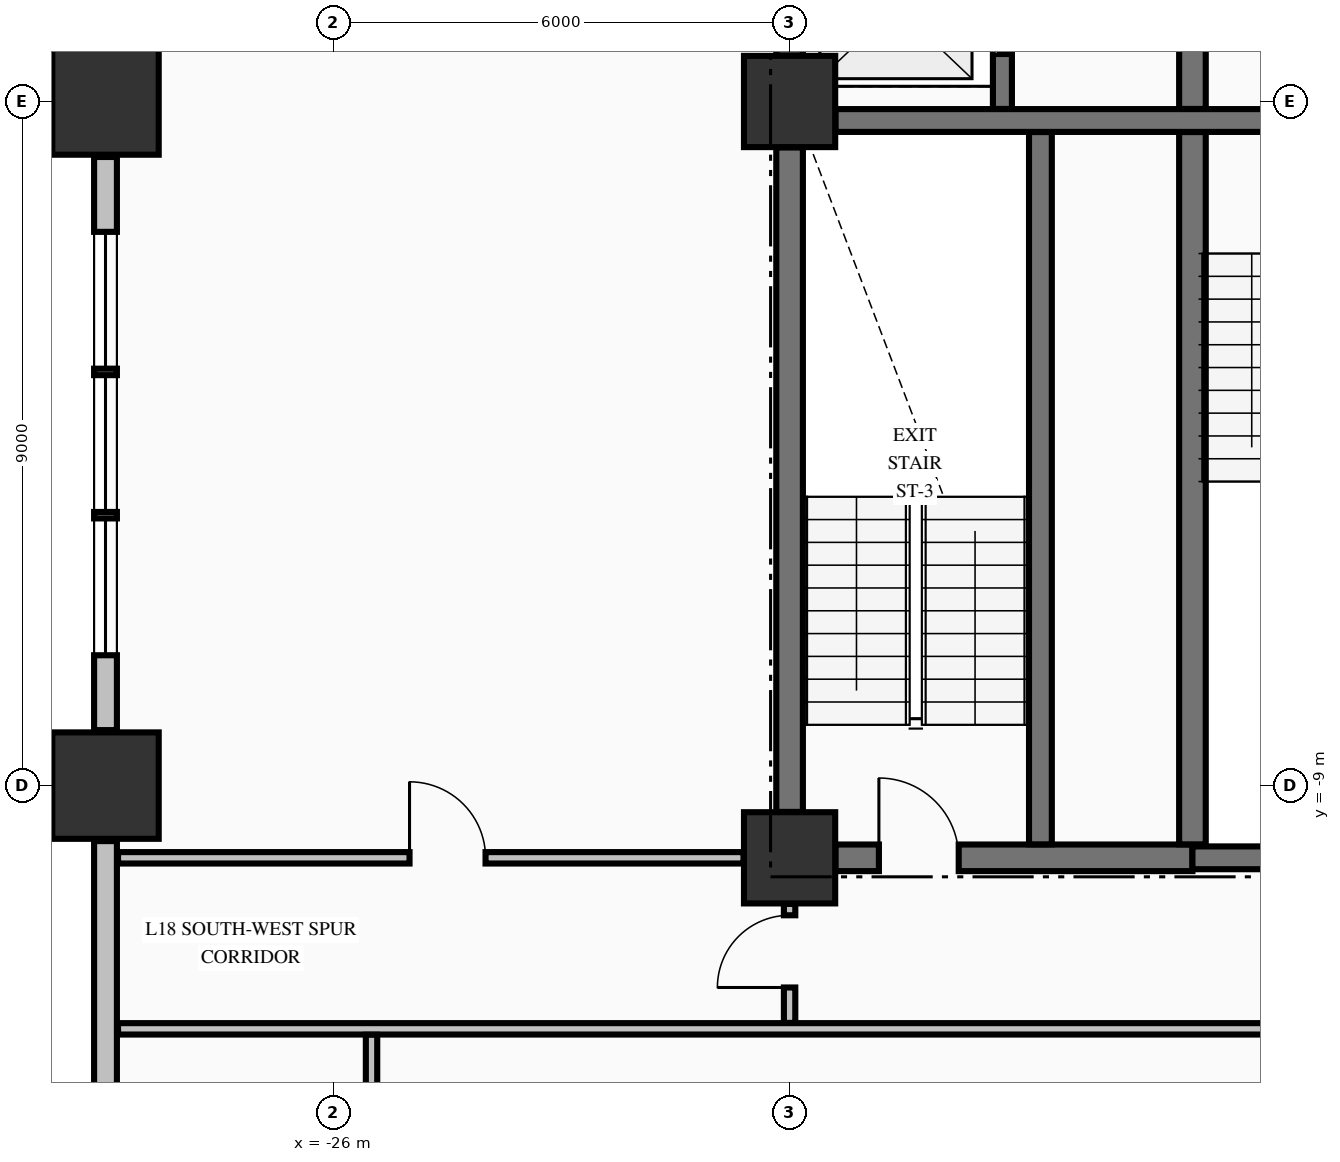
"""IFC4 building model, lengths in metres.
Left out: names, types, materials, properties, quantities, classifications, styles, units other than length and angle.
Written with IfcOpenShell. Run it as: python <this file> out.ifc"""

import sys

from ifc_helpers import new_model, si_unit, direction, frame, frame_2d, origin, origin_2d, place, context, subcontext, project, spatial, rectangle, extrude, element, fill, save


model = new_model("IFC4")
c1 = context("Model", 3, precision=1e-05, world=origin(), true_north=direction((0.0, 1.0)))
c2 = subcontext(c1, "Body", "Model", "MODEL_VIEW")
j1 = project(units=[si_unit("LENGTHUNIT", "METRE"), si_unit("PLANEANGLEUNIT", "RADIAN")], contexts=[c1])
p1 = place(None, origin())
s1 = spatial("IfcSite", under=j1, at=p1, CompositionType="ELEMENT")
p2 = place(p1, origin())
s2 = spatial("IfcBuilding", under=s1, at=p2, CompositionType="ELEMENT")
p3 = place(p2, frame((0.0, 0.0, 75.04)))
s3 = spatial("IfcBuildingStorey", under=s2, at=p3, CompositionType="ELEMENT", Elevation=75.04)
for number, where, z_axis, x_axis in (
    (1, (-29.0, -9.0, -0.25), (0.0, 0.0, 1.0), (1.0, 0.0, 0.0)),
    (2, (-29.0, 0.0, -0.25), (0.0, 0.0, 1.0), (1.0, 0.0, 0.0)),
):
    element("IfcColumn", number, at=place(p3, frame(where, z_axis=z_axis, x_axis=x_axis)), inside=s3, PredefinedType="COLUMN", context=c2, shape_type="SweptSolid", body=[
        extrude(rectangle(XDim=1.4, YDim=1.4, at=origin_2d()), origin(), (0.0, 0.0, 1.0), 3.57),
    ])
for number, where, z_axis, x_axis in (
    (3, (-20.0, -9.95, -0.25), (0.0, 0.0, 1.0), (1.0, 0.0, 0.0)),
    (4, (-20.0, 0.0, -0.25), (0.0, 0.0, 1.0), (1.0, 0.0, 0.0)),
):
    element("IfcColumn", number, at=place(p3, frame(where, z_axis=z_axis, x_axis=x_axis)), inside=s3, PredefinedType="COLUMN", context=c2, shape_type="SweptSolid", body=[
        extrude(rectangle(XDim=1.2, YDim=1.2, at=origin_2d()), origin(), (0.0, 0.0, 1.0), 3.57),
    ])
p4 = place(p3, frame((-29.0, -9.73, 0.0), z_axis=(0.0, 0.0, 1.0), x_axis=(0.0, -1.0, 0.0)))
e5 = element("IfcWall", 5, at=p4, inside=s3, PredefinedType="STANDARD", context=c2, shape_type="SweptSolid", body=[
    extrude(rectangle(XDim=12.54, YDim=0.3, at=frame_2d((6.27, 0.0))), origin(), (0.0, 0.0, 1.0), 2.712),
])
p5 = place(p3, frame((-29.0, -0.73, 0.0), z_axis=(0.0, 0.0, 1.0), x_axis=(0.0, -1.0, 0.0)))
e6 = element("IfcWall", 6, at=p5, inside=s3, PredefinedType="STANDARD", context=c2, shape_type="SweptSolid", body=[
    extrude(rectangle(XDim=7.54, YDim=0.3, at=frame_2d((3.77, 0.0))), origin(), (0.0, 0.0, 1.0), 2.712),
])
p6 = place(p5, frame((0.985, 0.0, 0.78)))
e7 = element("IfcOpeningElement", 7, at=p6, cuts=e6, PredefinedType="OPENING", context=c2, shape_type="SweptSolid", body=[
    extrude(rectangle(XDim=1.8, YDim=1.72, at=frame_2d((0.9, 0.86))), frame((0.0, 0.16, 0.0), z_axis=(0.0, -1.0, 0.0), x_axis=(1.0, 0.0, 0.0)), (0.0, 0.0, 1.0), 0.32),
])
p7 = place(p5, frame((2.87, 0.0, 0.78)))
e8 = element("IfcOpeningElement", 8, at=p7, cuts=e6, PredefinedType="OPENING", context=c2, shape_type="SweptSolid", body=[
    extrude(rectangle(XDim=1.8, YDim=1.72, at=frame_2d((0.9, 0.86))), frame((0.0, 0.16, 0.0), z_axis=(0.0, -1.0, 0.0), x_axis=(1.0, 0.0, 0.0)), (0.0, 0.0, 1.0), 0.32),
])
p8 = place(p5, frame((4.755, 0.0, 0.78)))
e9 = element("IfcOpeningElement", 9, at=p8, cuts=e6, PredefinedType="OPENING", context=c2, shape_type="SweptSolid", body=[
    extrude(rectangle(XDim=1.8, YDim=1.72, at=frame_2d((0.9, 0.86))), frame((0.0, 0.16, 0.0), z_axis=(0.0, -1.0, 0.0), x_axis=(1.0, 0.0, 0.0)), (0.0, 0.0, 1.0), 0.32),
])
p9 = place(p3, frame((-19.396, -9.95, 0.0), z_axis=(0.0, 0.0, 1.0), x_axis=(1.0, 0.0, 0.0)))
e10 = element("IfcWall", 10, at=p9, inside=s3, PredefinedType="SHEAR", context=c2, shape_type="SweptSolid", body=[
    extrude(rectangle(XDim=4.696, YDim=0.35, at=frame_2d((2.348, 0.0))), origin(), (0.0, 0.0, 1.0), 3.32),
])
p10 = place(p9, frame((0.571, 0.0, 0.0)))
e11 = element("IfcOpeningElement", 11, at=p10, cuts=e10, PredefinedType="OPENING", context=c2, shape_type="SweptSolid", body=[
    extrude(rectangle(XDim=1.05, YDim=2.15, at=frame_2d((0.525, 1.075))), frame((0.0, 0.185, 0.0), z_axis=(0.0, -1.0, 0.0), x_axis=(1.0, 0.0, 0.0)), (0.0, 0.0, 1.0), 0.37),
])
p11 = place(p3, frame((-14.7, -9.95, 0.0), z_axis=(0.0, 0.0, 1.0), x_axis=(1.0, 0.0, 0.0)))
e12 = element("IfcWall", 12, at=p11, inside=s3, PredefinedType="SHEAR", context=c2, shape_type="SweptSolid", body=[
    extrude(rectangle(XDim=3.096, YDim=0.3, at=frame_2d((1.548, 0.0))), origin(), (0.0, 0.0, 1.0), 3.32),
])
p12 = place(p3, frame((-19.396, -0.25, 0.0), z_axis=(0.0, 0.0, 1.0), x_axis=(1.0, 0.0, 0.0)))
e13 = element("IfcWall", 13, at=p12, inside=s3, PredefinedType="SHEAR", context=c2, shape_type="SweptSolid", body=[
    extrude(rectangle(XDim=7.792, YDim=0.3, at=frame_2d((3.896, 0.0))), origin(), (0.0, 0.0, 1.0), 3.32),
])
p13 = place(p12, frame((5.696, 0.0, 0.0)))
e14 = element("IfcOpeningElement", 14, at=p13, cuts=e13, PredefinedType="OPENING", context=c2, shape_type="SweptSolid", body=[
    extrude(rectangle(XDim=1.1, YDim=2.15, at=frame_2d((0.55, 1.075))), frame((0.0, 0.16, 0.0), z_axis=(0.0, -1.0, 0.0), x_axis=(1.0, 0.0, 0.0)), (0.0, 0.0, 1.0), 0.32),
])
p14 = place(p3, frame((-28.835, -12.2, 0.0), z_axis=(0.0, 0.0, 1.0), x_axis=(1.0, 0.0, 0.0)))
e15 = element("IfcWall", 15, at=p14, inside=s3, PredefinedType="PARTITIONING", context=c2, shape_type="SweptSolid", body=[
    extrude(rectangle(XDim=52.67, YDim=0.15, at=frame_2d((26.335, 0.0))), origin(), (0.0, 0.0, 1.0), 3.32),
])
p15 = place(p14, frame((30.685, 0.0, 0.0)))
e16 = element("IfcOpeningElement", 16, at=p15, cuts=e15, PredefinedType="OPENING", context=c2, shape_type="SweptSolid", body=[
    extrude(rectangle(XDim=1.1, YDim=2.15, at=frame_2d((0.55, 1.075))), frame((0.0, 0.085, 0.0), z_axis=(0.0, -1.0, 0.0), x_axis=(1.0, 0.0, 0.0)), (0.0, 0.0, 1.0), 0.17),
])
p16 = place(p14, frame((15.41, 0.0, 0.0)))
e17 = element("IfcOpeningElement", 17, at=p16, cuts=e15, PredefinedType="OPENING", context=c2, shape_type="SweptSolid", body=[
    extrude(rectangle(XDim=1.05, YDim=2.15, at=frame_2d((0.525, 1.075))), frame((0.0, 0.085, 0.0), z_axis=(0.0, -1.0, 0.0), x_axis=(1.0, 0.0, 0.0)), (0.0, 0.0, 1.0), 0.17),
])
p17 = place(p14, frame((41.21, 0.0, 0.0)))
e18 = element("IfcOpeningElement", 18, at=p17, cuts=e15, PredefinedType="OPENING", context=c2, shape_type="SweptSolid", body=[
    extrude(rectangle(XDim=1.05, YDim=2.15, at=frame_2d((0.525, 1.075))), frame((0.0, 0.085, 0.0), z_axis=(0.0, -1.0, 0.0), x_axis=(1.0, 0.0, 0.0)), (0.0, 0.0, 1.0), 0.17),
])
p18 = place(p3, frame((-28.835, -9.95, 0.0), z_axis=(0.0, 0.0, 1.0), x_axis=(1.0, 0.0, 0.0)))
e19 = element("IfcWall", 19, at=p18, inside=s3, PredefinedType="PARTITIONING", context=c2, shape_type="SweptSolid", body=[
    extrude(rectangle(XDim=8.229, YDim=0.15, at=frame_2d((4.115, 0.0))), origin(), (0.0, 0.0, 1.0), 3.32),
])
p19 = place(p18, frame((3.835, 0.0, 0.0)))
e20 = element("IfcOpeningElement", 20, at=p19, cuts=e19, PredefinedType="OPENING", context=c2, shape_type="SweptSolid", body=[
    extrude(rectangle(XDim=1.0, YDim=2.15, at=frame_2d((0.5, 1.075))), frame((0.0, 0.085, 0.0), z_axis=(0.0, -1.0, 0.0), x_axis=(1.0, 0.0, 0.0)), (0.0, 0.0, 1.0), 0.17),
])
p20 = place(p3, frame((-20.0, -9.346, 0.0), z_axis=(0.0, 0.0, 1.0), x_axis=(0.0, 1.0, 0.0)))
e21 = element("IfcWall", 21, at=p20, inside=s3, PredefinedType="SHEAR", context=c2, shape_type="SweptSolid", body=[
    extrude(rectangle(XDim=8.742, YDim=0.35, at=frame_2d((4.371, 0.0))), origin(), (0.0, 0.0, 1.0), 3.32),
])
p21 = place(p3, frame((-20.0, 0.604, 0.0), z_axis=(0.0, 0.0, 1.0), x_axis=(0.0, 1.0, 0.0)))
e22 = element("IfcWall", 22, at=p21, inside=s3, PredefinedType="SHEAR", context=c2, shape_type="SweptSolid", body=[
    extrude(rectangle(XDim=1.869, YDim=0.35, at=frame_2d((0.935, 0.0))), origin(), (0.0, 0.0, 1.0), 3.32),
])
p22 = place(p3, frame((-17.2, -0.098, 0.0), z_axis=(0.0, 0.0, 1.0), x_axis=(0.0, 1.0, 0.0)))
e23 = element("IfcWall", 23, at=p22, inside=s3, PredefinedType="SOLIDWALL", context=c2, shape_type="SweptSolid", body=[
    extrude(rectangle(XDim=2.571, YDim=0.25, at=frame_2d((1.285, 0.0))), origin(), (0.0, 0.0, 1.0), 3.32),
])
p23 = place(p22, frame((0.723, 0.0, 0.0)))
e24 = element("IfcOpeningElement", 24, at=p23, cuts=e23, PredefinedType="OPENING", context=c2, shape_type="SweptSolid", body=[
    extrude(rectangle(XDim=1.1, YDim=2.2, at=frame_2d((0.55, 1.1))), frame((0.0, 0.135, 0.0), z_axis=(0.0, -1.0, 0.0), x_axis=(1.0, 0.0, 0.0)), (0.0, 0.0, 1.0), 0.27),
])
p24 = place(p3, frame((-16.7, -9.773, 0.0), z_axis=(0.0, 0.0, 1.0), x_axis=(0.0, 1.0, 0.0)))
e25 = element("IfcWall", 25, at=p24, inside=s3, PredefinedType="SHEAR", context=c2, shape_type="SweptSolid", body=[
    extrude(rectangle(XDim=9.371, YDim=0.3, at=frame_2d((4.686, 0.0))), origin(), (0.0, 0.0, 1.0), 3.32),
])
p25 = place(p3, frame((-14.7, -9.773, 0.0), z_axis=(0.0, 0.0, 1.0), x_axis=(0.0, 1.0, 0.0)))
e26 = element("IfcWall", 26, at=p25, inside=s3, PredefinedType="SHEAR", context=c2, shape_type="SweptSolid", body=[
    extrude(rectangle(XDim=9.371, YDim=0.35, at=frame_2d((4.686, 0.0))), origin(), (0.0, 0.0, 1.0), 3.32),
])
p26 = place(p3, frame((-14.7, -0.098, 0.0), z_axis=(0.0, 0.0, 1.0), x_axis=(0.0, 1.0, 0.0)))
e27 = element("IfcWall", 27, at=p26, inside=s3, PredefinedType="SHEAR", context=c2, shape_type="SweptSolid", body=[
    extrude(rectangle(XDim=2.846, YDim=0.35, at=frame_2d((1.423, 0.0))), origin(), (0.0, 0.0, 1.0), 3.32),
])
p27 = place(p3, frame((-25.5, -22.294, 0.0), z_axis=(0.0, 0.0, 1.0), x_axis=(0.0, 1.0, 0.0)))
e28 = element("IfcWall", 28, at=p27, inside=s3, PredefinedType="PARTITIONING", context=c2, shape_type="SweptSolid", body=[
    extrude(rectangle(XDim=10.016, YDim=0.15, at=frame_2d((5.008, 0.0))), origin(), (0.0, 0.0, 1.0), 3.32),
])
p28 = place(p3, frame((-20.0, -12.122, 0.0), z_axis=(0.0, 0.0, 1.0), x_axis=(0.0, 1.0, 0.0)))
e29 = element("IfcWall", 29, at=p28, inside=s3, PredefinedType="PARTITIONING", context=c2, shape_type="SweptSolid", body=[
    extrude(rectangle(XDim=1.566, YDim=0.15, at=frame_2d((0.783, 0.0))), origin(), (0.0, 0.0, 1.0), 2.66),
])
p29 = place(p28, frame((0.466, 0.0, 0.0)))
e30 = element("IfcOpeningElement", 30, at=p29, cuts=e29, PredefinedType="OPENING", context=c2, shape_type="SweptSolid", body=[
    extrude(rectangle(XDim=0.95, YDim=2.15, at=frame_2d((0.475, 1.075))), frame((0.0, 0.085, 0.0), z_axis=(0.0, -1.0, 0.0), x_axis=(1.0, 0.0, 0.0)), (0.0, 0.0, 1.0), 0.17),
])
p30 = place(p6, origin())
e31 = element("IfcWindow", 31, at=p30, inside=s3, PartitioningType="SINGLE_PANEL", PredefinedType="WINDOW", context=c2, shape_type="SweptSolid", body=[
    extrude(rectangle(XDim=1.8, YDim=1.72, at=frame_2d((0.9, 0.86))), frame((0.0, 0.03, 0.0), z_axis=(0.0, -1.0, 0.0), x_axis=(1.0, 0.0, 0.0)), (0.0, 0.0, 1.0), 0.06),
])
fill(e7, e31)
p31 = place(p7, origin())
e32 = element("IfcWindow", 32, at=p31, inside=s3, PartitioningType="SINGLE_PANEL", PredefinedType="WINDOW", context=c2, shape_type="SweptSolid", body=[
    extrude(rectangle(XDim=1.8, YDim=1.72, at=frame_2d((0.9, 0.86))), frame((0.0, 0.03, 0.0), z_axis=(0.0, -1.0, 0.0), x_axis=(1.0, 0.0, 0.0)), (0.0, 0.0, 1.0), 0.06),
])
fill(e8, e32)
p32 = place(p8, origin())
e33 = element("IfcWindow", 33, at=p32, inside=s3, PartitioningType="SINGLE_PANEL", PredefinedType="WINDOW", context=c2, shape_type="SweptSolid", body=[
    extrude(rectangle(XDim=1.8, YDim=1.72, at=frame_2d((0.9, 0.86))), frame((0.0, 0.03, 0.0), z_axis=(0.0, -1.0, 0.0), x_axis=(1.0, 0.0, 0.0)), (0.0, 0.0, 1.0), 0.06),
])
fill(e9, e33)
p33 = place(p10, origin())
e34 = element("IfcDoor", 34, at=p33, inside=s3, OperationType="SINGLE_SWING_LEFT", PredefinedType="DOOR", context=c2, shape_type="SweptSolid", body=[
    extrude(rectangle(XDim=1.05, YDim=2.15, at=frame_2d((0.525, 1.075))), frame((0.0, 0.025, 0.0), z_axis=(0.0, -1.0, 0.0), x_axis=(1.0, 0.0, 0.0)), (0.0, 0.0, 1.0), 0.05),
])
fill(e11, e34)
p34 = place(p23, origin())
e35 = element("IfcDoor", 35, at=p34, inside=s3, OperationType="SLIDING_TO_LEFT", PredefinedType="DOOR", context=c2, shape_type="SweptSolid", body=[
    extrude(rectangle(XDim=1.1, YDim=2.2, at=frame_2d((0.55, 1.1))), frame((0.0, 0.025, 0.0), z_axis=(0.0, -1.0, 0.0), x_axis=(1.0, 0.0, 0.0)), (0.0, 0.0, 1.0), 0.05),
])
fill(e24, e35)
p35 = place(p29, origin())
e36 = element("IfcDoor", 36, at=p35, inside=s3, OperationType="SINGLE_SWING_LEFT", PredefinedType="DOOR", context=c2, shape_type="SweptSolid", body=[
    extrude(rectangle(XDim=0.95, YDim=2.15, at=frame_2d((0.475, 1.075))), frame((0.0, 0.025, 0.0), z_axis=(0.0, -1.0, 0.0), x_axis=(1.0, 0.0, 0.0)), (0.0, 0.0, 1.0), 0.05),
])
fill(e30, e36)
p36 = place(p19, origin())
e37 = element("IfcDoor", 37, at=p36, inside=s3, OperationType="SINGLE_SWING_LEFT", PredefinedType="DOOR", context=c2, shape_type="SweptSolid", body=[
    extrude(rectangle(XDim=1.0, YDim=2.15, at=frame_2d((0.5, 1.075))), frame((0.0, 0.025, 0.0), z_axis=(0.0, -1.0, 0.0), x_axis=(1.0, 0.0, 0.0)), (0.0, 0.0, 1.0), 0.05),
])
fill(e20, e37)
save(model, sys.argv[1])
